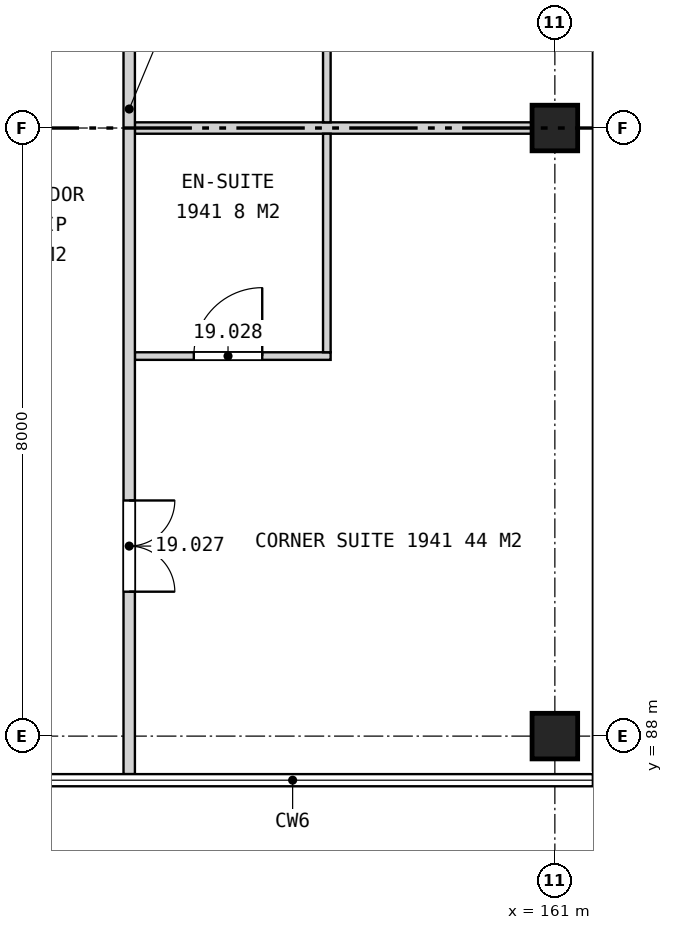
"""IFC4 building model, lengths in metres.
Left out: names, types, materials, properties, quantities, classifications, styles, units other than length and angle.
Written with IfcOpenShell. Run it as: python <this file> out.ifc"""

import sys

from ifc_helpers import new_model, si_unit, direction, frame, frame_2d, origin, origin_2d, place, context, subcontext, project, spatial, rectangle, extrude, element, fill, save


model = new_model("IFC4")
c1 = context("Model", 3, precision=1e-05, world=origin(), true_north=direction((0.0, 1.0)))
c2 = subcontext(c1, "Body", "Model", "MODEL_VIEW")
j1 = project(units=[si_unit("LENGTHUNIT", "METRE"), si_unit("PLANEANGLEUNIT", "RADIAN")], contexts=[c1])
p1 = place(None, origin())
s1 = spatial("IfcSite", under=j1, at=p1, CompositionType="ELEMENT")
p2 = place(p1, origin())
s2 = spatial("IfcBuilding", under=s1, at=p2, CompositionType="ELEMENT")
p3 = place(p2, frame((0.0, 0.0, 97.9)))
s3 = spatial("IfcBuildingStorey", under=s2, at=p3, CompositionType="ELEMENT", Elevation=97.9)
for number, where, z_axis, x_axis in (
    (1, (161.0, 88.0, 0.0), (0.0, 0.0, 1.0), (1.0, 0.0, 0.0)),
    (2, (161.0, 96.0, 0.0), (0.0, 0.0, 1.0), (1.0, 0.0, 0.0)),
):
    element("IfcColumn", number, at=place(p3, frame(where, z_axis=z_axis, x_axis=x_axis)), inside=s3, PredefinedType="COLUMN", context=c2, shape_type="SweptSolid", body=[
        extrude(rectangle(XDim=0.6, YDim=0.6, at=origin_2d()), origin(), (0.0, 0.0, 1.0), 3.7),
    ])
p4 = place(p3, frame((155.475, 93.0, 0.0), z_axis=(0.0, 0.0, 1.0), x_axis=(1.0, 0.0, 0.0)))
e3 = element("IfcWall", 3, at=p4, inside=s3, PredefinedType="PLUMBINGWALL", context=c2, shape_type="SweptSolid", body=[
    extrude(rectangle(XDim=2.575, YDim=0.1, at=frame_2d((1.288, 0.0))), origin(), (0.0, 0.0, 1.0), 3.7),
])
p5 = place(p4, frame((0.775, 0.0, 0.0)))
e4 = element("IfcOpeningElement", 4, at=p5, cuts=e3, PredefinedType="OPENING", context=c2, shape_type="SweptSolid", body=[
    extrude(rectangle(XDim=0.9, YDim=2.1, at=frame_2d((0.45, 1.05))), frame((0.0, 0.06, 0.0), z_axis=(0.0, -1.0, 0.0), x_axis=(1.0, 0.0, 0.0)), (0.0, 0.0, 1.0), 0.12),
])
p6 = place(p3, frame((155.475, 96.0, 0.0), z_axis=(0.0, 0.0, 1.0), x_axis=(1.0, 0.0, 0.0)))
e5 = element("IfcWall", 5, at=p6, inside=s3, PredefinedType="PARTITIONING", context=c2, shape_type="SweptSolid", body=[
    extrude(rectangle(XDim=5.225, YDim=0.15, at=frame_2d((2.612, 0.0))), origin(), (0.0, 0.0, 1.0), 2.957),
])
p7 = place(p3, frame((155.4, 87.5, 0.0), z_axis=(0.0, 0.0, 1.0), x_axis=(0.0, 1.0, 0.0)))
e6 = element("IfcWall", 6, at=p7, inside=s3, PredefinedType="PARTITIONING", context=c2, shape_type="SweptSolid", body=[
    extrude(rectangle(XDim=25.0, YDim=0.15, at=frame_2d((12.5, 0.0))), origin(), (0.0, 0.0, 1.0), 2.957),
])
p8 = place(p7, frame((2.4, 0.0, 0.0)))
e7 = element("IfcOpeningElement", 7, at=p8, cuts=e6, PredefinedType="OPENING", context=c2, shape_type="SweptSolid", body=[
    extrude(rectangle(XDim=1.2, YDim=2.2, at=frame_2d((0.6, 1.1))), frame((0.0, 0.085, 0.0), z_axis=(0.0, -1.0, 0.0), x_axis=(1.0, 0.0, 0.0)), (0.0, 0.0, 1.0), 0.17),
])
p9 = place(p7, frame((13.4, 0.0, 0.0)))
e8 = element("IfcOpeningElement", 8, at=p9, cuts=e6, PredefinedType="OPENING", context=c2, shape_type="SweptSolid", body=[
    extrude(rectangle(XDim=1.2, YDim=2.2, at=frame_2d((0.6, 1.1))), frame((0.0, 0.085, 0.0), z_axis=(0.0, -1.0, 0.0), x_axis=(1.0, 0.0, 0.0)), (0.0, 0.0, 1.0), 0.17),
])
p10 = place(p7, frame((18.4, 0.0, 0.0)))
e9 = element("IfcOpeningElement", 9, at=p10, cuts=e6, PredefinedType="OPENING", context=c2, shape_type="SweptSolid", body=[
    extrude(rectangle(XDim=1.2, YDim=2.2, at=frame_2d((0.6, 1.1))), frame((0.0, 0.085, 0.0), z_axis=(0.0, -1.0, 0.0), x_axis=(1.0, 0.0, 0.0)), (0.0, 0.0, 1.0), 0.17),
])
for number, where, z_axis, x_axis in (
    (10, (158.0, 93.05, 0.0), (0.0, 0.0, 1.0), (0.0, 1.0, 0.0)),
    (11, (158.0, 96.075, 0.0), (0.0, 0.0, 1.0), (0.0, 1.0, 0.0)),
):
    element("IfcWall", number, at=place(p3, frame(where, z_axis=z_axis, x_axis=x_axis)), inside=s3, PredefinedType="PLUMBINGWALL", context=c2, shape_type="SweptSolid", body=[
        extrude(rectangle(XDim=2.875, YDim=0.1, at=frame_2d((1.438, 0.0))), origin(), (0.0, 0.0, 1.0), 3.7),
    ])
p11 = place(p8, frame((1.2, 0.0, 0.0), z_axis=(0.0, 0.0, 1.0), x_axis=(-1.0, 0.0, 0.0)))
e12 = element("IfcDoor", 12, at=p11, inside=s3, OperationType="DOUBLE_DOOR_SINGLE_SWING", PredefinedType="DOOR", context=c2, shape_type="SweptSolid", body=[
    extrude(rectangle(XDim=1.2, YDim=2.2, at=frame_2d((0.6, 1.1))), frame((0.0, 0.025, 0.0), z_axis=(0.0, -1.0, 0.0), x_axis=(1.0, 0.0, 0.0)), (0.0, 0.0, 1.0), 0.05),
])
fill(e7, e12)
p12 = place(p5, origin())
e13 = element("IfcDoor", 13, at=p12, inside=s3, OperationType="SINGLE_SWING_RIGHT", PredefinedType="DOOR", context=c2, shape_type="SweptSolid", body=[
    extrude(rectangle(XDim=0.9, YDim=2.1, at=frame_2d((0.45, 1.05))), frame((0.0, 0.025, 0.0), z_axis=(0.0, -1.0, 0.0), x_axis=(1.0, 0.0, 0.0)), (0.0, 0.0, 1.0), 0.05),
])
fill(e4, e13)
save(model, sys.argv[1])
